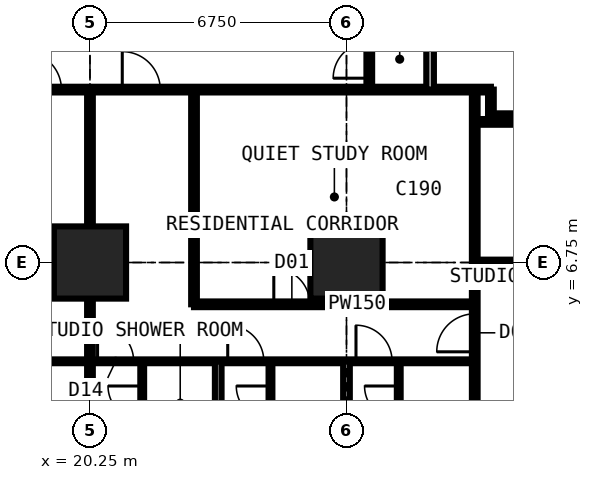
"""IFC4 building model, lengths in metres.
Left out: names, types, materials, properties, quantities, classifications, styles, units other than length and angle.
Written with IfcOpenShell. Run it as: python <this file> out.ifc"""

import sys

from ifc_helpers import new_model, si_unit, direction, frame, frame_2d, origin, origin_2d, place, context, subcontext, project, spatial, rectangle, extrude, element, fill, save


model = new_model("IFC4")
c1 = context("Model", 3, precision=1e-05, world=origin(), true_north=direction((0.0, 1.0)))
c2 = subcontext(c1, "Body", "Model", "MODEL_VIEW")
j1 = project(units=[si_unit("LENGTHUNIT", "METRE"), si_unit("PLANEANGLEUNIT", "RADIAN")], contexts=[c1])
p1 = place(None, origin())
s1 = spatial("IfcSite", under=j1, at=p1, CompositionType="ELEMENT")
p2 = place(p1, origin())
s2 = spatial("IfcBuilding", under=s1, at=p2, CompositionType="ELEMENT")
p3 = place(p2, frame((0.0, 0.0, 39.6)))
s3 = spatial("IfcBuildingStorey", under=s2, at=p3, CompositionType="ELEMENT", Elevation=39.6)
for number, where, z_axis, x_axis in (
    (1, (20.25, 6.75, 0.0), (0.0, 0.0, 1.0), (1.0, 0.0, 0.0)),
    (2, (27.0, 6.75, 0.0), (0.0, 0.0, 1.0), (1.0, 0.0, 0.0)),
):
    element("IfcColumn", number, at=place(p3, frame(where, z_axis=z_axis, x_axis=x_axis)), inside=s3, PredefinedType="COLUMN", context=c2, shape_type="SweptSolid", body=[
        extrude(rectangle(XDim=1.9, YDim=1.9, at=origin_2d()), origin(), (0.0, 0.0, 1.0), 3.6),
    ])
p4 = place(p3, frame((6.75, 4.15, 0.0), z_axis=(0.0, 0.0, 1.0), x_axis=(1.0, 0.0, 0.0)))
e3 = element("IfcWall", 3, at=p4, inside=s3, PredefinedType="PARTITIONING", context=c2, shape_type="SweptSolid", body=[
    extrude(rectangle(XDim=23.625, YDim=0.1, at=frame_2d((11.812, 0.0))), origin(), (0.0, 0.0, 1.0), 3.375),
])
p5 = place(p4, frame((1.2, 0.0, 0.0)))
e4 = element("IfcOpeningElement", 4, at=p5, cuts=e3, PredefinedType="OPENING", context=c2, shape_type="SweptSolid", body=[
    extrude(rectangle(XDim=1.0, YDim=2.2, at=frame_2d((0.5, 1.1))), frame((0.0, 0.06, 0.0), z_axis=(0.0, -1.0, 0.0), x_axis=(1.0, 0.0, 0.0)), (0.0, 0.0, 1.0), 0.12),
])
p6 = place(p4, frame((3.575, 0.0, 0.0)))
e5 = element("IfcOpeningElement", 5, at=p6, cuts=e3, PredefinedType="OPENING", context=c2, shape_type="SweptSolid", body=[
    extrude(rectangle(XDim=0.95, YDim=2.2, at=frame_2d((0.475, 1.1))), frame((0.0, 0.06, 0.0), z_axis=(0.0, -1.0, 0.0), x_axis=(1.0, 0.0, 0.0)), (0.0, 0.0, 1.0), 0.12),
])
p7 = place(p4, frame((7.0, 0.0, 0.0)))
e6 = element("IfcOpeningElement", 6, at=p7, cuts=e3, PredefinedType="OPENING", context=c2, shape_type="SweptSolid", body=[
    extrude(rectangle(XDim=0.95, YDim=2.2, at=frame_2d((0.475, 1.1))), frame((0.0, 0.06, 0.0), z_axis=(0.0, -1.0, 0.0), x_axis=(1.0, 0.0, 0.0)), (0.0, 0.0, 1.0), 0.12),
])
p8 = place(p4, frame((10.375, 0.0, 0.0)))
e7 = element("IfcOpeningElement", 7, at=p8, cuts=e3, PredefinedType="OPENING", context=c2, shape_type="SweptSolid", body=[
    extrude(rectangle(XDim=0.95, YDim=2.2, at=frame_2d((0.475, 1.1))), frame((0.0, 0.06, 0.0), z_axis=(0.0, -1.0, 0.0), x_axis=(1.0, 0.0, 0.0)), (0.0, 0.0, 1.0), 0.12),
])
p9 = place(p4, frame((13.7, 0.0, 0.0)))
e8 = element("IfcOpeningElement", 8, at=p9, cuts=e3, PredefinedType="OPENING", context=c2, shape_type="SweptSolid", body=[
    extrude(rectangle(XDim=0.95, YDim=2.2, at=frame_2d((0.475, 1.1))), frame((0.0, 0.06, 0.0), z_axis=(0.0, -1.0, 0.0), x_axis=(1.0, 0.0, 0.0)), (0.0, 0.0, 1.0), 0.12),
])
p10 = place(p4, frame((17.125, 0.0, 0.0)))
e9 = element("IfcOpeningElement", 9, at=p10, cuts=e3, PredefinedType="OPENING", context=c2, shape_type="SweptSolid", body=[
    extrude(rectangle(XDim=0.95, YDim=2.2, at=frame_2d((0.475, 1.1))), frame((0.0, 0.06, 0.0), z_axis=(0.0, -1.0, 0.0), x_axis=(1.0, 0.0, 0.0)), (0.0, 0.0, 1.0), 0.12),
])
p11 = place(p4, frame((20.5, 0.0, 0.0)))
e10 = element("IfcOpeningElement", 10, at=p11, cuts=e3, PredefinedType="OPENING", context=c2, shape_type="SweptSolid", body=[
    extrude(rectangle(XDim=0.95, YDim=2.2, at=frame_2d((0.475, 1.1))), frame((0.0, 0.06, 0.0), z_axis=(0.0, -1.0, 0.0), x_axis=(1.0, 0.0, 0.0)), (0.0, 0.0, 1.0), 0.12),
])
p12 = place(p3, frame((10.125, 11.3, 0.0), z_axis=(0.0, 0.0, 1.0), x_axis=(1.0, 0.0, 0.0)))
e11 = element("IfcWall", 11, at=p12, inside=s3, PredefinedType="PARTITIONING", context=c2, shape_type="SweptSolid", body=[
    extrude(rectangle(XDim=20.675, YDim=0.15, at=frame_2d((10.337, 0.0))), origin(), (0.0, 0.0, 1.0), 3.375),
])
p13 = place(p12, frame((8.375, 0.0, 0.0)))
e12 = element("IfcOpeningElement", 12, at=p13, cuts=e11, PredefinedType="OPENING", context=c2, shape_type="SweptSolid", body=[
    extrude(rectangle(XDim=1.0, YDim=2.2, at=frame_2d((0.5, 1.1))), frame((0.0, 0.085, 0.0), z_axis=(0.0, -1.0, 0.0), x_axis=(1.0, 0.0, 0.0)), (0.0, 0.0, 1.0), 0.17),
])
p14 = place(p12, frame((10.975, 0.0, 0.0)))
e13 = element("IfcOpeningElement", 13, at=p14, cuts=e11, PredefinedType="OPENING", context=c2, shape_type="SweptSolid", body=[
    extrude(rectangle(XDim=1.0, YDim=2.2, at=frame_2d((0.5, 1.1))), frame((0.0, 0.085, 0.0), z_axis=(0.0, -1.0, 0.0), x_axis=(1.0, 0.0, 0.0)), (0.0, 0.0, 1.0), 0.17),
])
p15 = place(p12, frame((3.925, 0.0, 0.0)))
e14 = element("IfcOpeningElement", 14, at=p15, cuts=e11, PredefinedType="OPENING", context=c2, shape_type="SweptSolid", body=[
    extrude(rectangle(XDim=0.95, YDim=2.2, at=frame_2d((0.475, 1.1))), frame((0.0, 0.085, 0.0), z_axis=(0.0, -1.0, 0.0), x_axis=(1.0, 0.0, 0.0)), (0.0, 0.0, 1.0), 0.17),
])
p16 = place(p3, frame((20.25, -0.734, 0.0), z_axis=(0.0, 0.0, 1.0), x_axis=(0.0, 1.0, 0.0)))
e15 = element("IfcWall", 15, at=p16, inside=s3, PredefinedType="PARTITIONING", context=c2, shape_type="SweptSolid", body=[
    extrude(rectangle(XDim=12.034, YDim=0.15, at=frame_2d((6.017, 0.0))), origin(), (0.0, 0.0, 1.0), 2.61),
])
p17 = place(p3, frame((21.625, 1.95, 0.0), z_axis=(0.0, 0.0, 1.0), x_axis=(0.0, 1.0, 0.0)))
e16 = element("IfcWall", 16, at=p17, inside=s3, PredefinedType="PARTITIONING", context=c2, shape_type="SweptSolid", body=[
    extrude(rectangle(XDim=2.2, YDim=0.1, at=frame_2d((1.1, 0.0))), origin(), (0.0, 0.0, 1.0), 3.375),
])
p18 = place(p17, frame((0.65, 0.0, 0.0)))
e17 = element("IfcOpeningElement", 17, at=p18, cuts=e16, PredefinedType="OPENING", context=c2, shape_type="SweptSolid", body=[
    extrude(rectangle(XDim=0.9, YDim=2.2, at=frame_2d((0.45, 1.1))), frame((0.0, 0.06, 0.0), z_axis=(0.0, -1.0, 0.0), x_axis=(1.0, 0.0, 0.0)), (0.0, 0.0, 1.0), 0.12),
])
p19 = place(p3, frame((22.988, 5.65, 0.0), z_axis=(0.0, 0.0, 1.0), x_axis=(1.0, 0.0, 0.0)))
e18 = element("IfcWall", 18, at=p19, inside=s3, PredefinedType="PARTITIONING", context=c2, shape_type="SweptSolid", body=[
    extrude(rectangle(XDim=7.387, YDim=0.15, at=frame_2d((3.694, 0.0))), origin(), (0.0, 0.0, 1.0), 3.375),
])
p20 = place(p19, frame((2.1, 0.0, 0.0)))
e19 = element("IfcOpeningElement", 19, at=p20, cuts=e18, PredefinedType="OPENING", context=c2, shape_type="SweptSolid", body=[
    extrude(rectangle(XDim=0.95, YDim=2.2, at=frame_2d((0.475, 1.1))), frame((0.0, 0.085, 0.0), z_axis=(0.0, -1.0, 0.0), x_axis=(1.0, 0.0, 0.0)), (0.0, 0.0, 1.0), 0.17),
])
p21 = place(p3, frame((22.988, 5.65, 0.0), z_axis=(0.0, 0.0, 1.0), x_axis=(0.0, 1.0, 0.0)))
e20 = element("IfcWall", 20, at=p21, inside=s3, PredefinedType="PARTITIONING", context=c2, shape_type="SweptSolid", body=[
    extrude(rectangle(XDim=5.65, YDim=0.15, at=frame_2d((2.825, 0.0))), origin(), (0.0, 0.0, 1.0), 3.375),
])
p22 = place(p3, frame((23.625, -0.734, 0.0), z_axis=(0.0, 0.0, 1.0), x_axis=(0.0, 1.0, 0.0)))
e21 = element("IfcWall", 21, at=p22, inside=s3, PredefinedType="PARTITIONING", context=c2, shape_type="SweptSolid", body=[
    extrude(rectangle(XDim=4.884, YDim=0.175, at=frame_2d((2.442, 0.0))), origin(), (0.0, 0.0, 1.0), 3.375),
])
p23 = place(p3, frame((25.0, 1.95, 0.0), z_axis=(0.0, 0.0, 1.0), x_axis=(0.0, 1.0, 0.0)))
e22 = element("IfcWall", 22, at=p23, inside=s3, PredefinedType="PARTITIONING", context=c2, shape_type="SweptSolid", body=[
    extrude(rectangle(XDim=2.2, YDim=0.1, at=frame_2d((1.1, 0.0))), origin(), (0.0, 0.0, 1.0), 3.375),
])
p24 = place(p23, frame((0.65, 0.0, 0.0)))
e23 = element("IfcOpeningElement", 23, at=p24, cuts=e22, PredefinedType="OPENING", context=c2, shape_type="SweptSolid", body=[
    extrude(rectangle(XDim=0.9, YDim=2.2, at=frame_2d((0.45, 1.1))), frame((0.0, 0.06, 0.0), z_axis=(0.0, -1.0, 0.0), x_axis=(1.0, 0.0, 0.0)), (0.0, 0.0, 1.0), 0.12),
])
p25 = place(p3, frame((27.0, -0.734, 0.0), z_axis=(0.0, 0.0, 1.0), x_axis=(0.0, 1.0, 0.0)))
e24 = element("IfcWall", 24, at=p25, inside=s3, PredefinedType="PARTITIONING", context=c2, shape_type="SweptSolid", body=[
    extrude(rectangle(XDim=4.884, YDim=0.175, at=frame_2d((2.442, 0.0))), origin(), (0.0, 0.0, 1.0), 2.61),
])
p26 = place(p3, frame((27.6, 11.3, 0.0), z_axis=(0.0, 0.0, 1.0), x_axis=(0.0, 1.0, 0.0)))
e25 = element("IfcWall", 25, at=p26, inside=s3, PredefinedType="PARTITIONING", context=c2, shape_type="SweptSolid", body=[
    extrude(rectangle(XDim=1.6, YDim=0.15, at=frame_2d((0.8, 0.0))), origin(), (0.0, 0.0, 1.0), 3.375),
])
p27 = place(p26, frame((0.3, 0.0, 0.0)))
e26 = element("IfcOpeningElement", 26, at=p27, cuts=e25, PredefinedType="OPENING", context=c2, shape_type="SweptSolid", body=[
    extrude(rectangle(XDim=0.95, YDim=2.2, at=frame_2d((0.475, 1.1))), frame((0.0, 0.085, 0.0), z_axis=(0.0, -1.0, 0.0), x_axis=(1.0, 0.0, 0.0)), (0.0, 0.0, 1.0), 0.17),
])
p28 = place(p3, frame((28.375, 1.95, 0.0), z_axis=(0.0, 0.0, 1.0), x_axis=(0.0, 1.0, 0.0)))
e27 = element("IfcWall", 27, at=p28, inside=s3, PredefinedType="PARTITIONING", context=c2, shape_type="SweptSolid", body=[
    extrude(rectangle(XDim=2.2, YDim=0.1, at=frame_2d((1.1, 0.0))), origin(), (0.0, 0.0, 1.0), 3.375),
])
p29 = place(p28, frame((0.65, 0.0, 0.0)))
e28 = element("IfcOpeningElement", 28, at=p29, cuts=e27, PredefinedType="OPENING", context=c2, shape_type="SweptSolid", body=[
    extrude(rectangle(XDim=0.9, YDim=2.2, at=frame_2d((0.45, 1.1))), frame((0.0, 0.06, 0.0), z_axis=(0.0, -1.0, 0.0), x_axis=(1.0, 0.0, 0.0)), (0.0, 0.0, 1.0), 0.12),
])
p30 = place(p3, frame((29.2, 11.3, 0.0), z_axis=(0.0, 0.0, 1.0), x_axis=(0.0, 1.0, 0.0)))
e29 = element("IfcWall", 29, at=p30, inside=s3, PredefinedType="PARTITIONING", context=c2, shape_type="SweptSolid", body=[
    extrude(rectangle(XDim=17.9, YDim=0.2, at=frame_2d((8.95, 0.0))), origin(), (0.0, 0.0, 1.0), 3.375),
])
p31 = place(p30, frame((8.35, 0.0, 0.0)))
e30 = element("IfcOpeningElement", 30, at=p31, cuts=e29, PredefinedType="OPENING", context=c2, shape_type="SweptSolid", body=[
    extrude(rectangle(XDim=1.2, YDim=2.2, at=frame_2d((0.6, 1.1))), frame((0.0, 0.11, 0.0), z_axis=(0.0, -1.0, 0.0), x_axis=(1.0, 0.0, 0.0)), (0.0, 0.0, 1.0), 0.22),
])
p32 = place(p3, frame((30.375, -0.734, 0.0), z_axis=(0.0, 0.0, 1.0), x_axis=(0.0, 1.0, 0.0)))
e31 = element("IfcWall", 31, at=p32, inside=s3, PredefinedType="PARTITIONING", context=c2, shape_type="SweptSolid", body=[
    extrude(rectangle(XDim=12.034, YDim=0.15, at=frame_2d((6.017, 0.0))), origin(), (0.0, 0.0, 1.0), 3.375),
])
p33 = place(p32, frame((5.134, 0.0, 0.0)))
e32 = element("IfcOpeningElement", 32, at=p33, cuts=e31, PredefinedType="OPENING", context=c2, shape_type="SweptSolid", body=[
    extrude(rectangle(XDim=1.0, YDim=2.2, at=frame_2d((0.5, 1.1))), frame((0.0, 0.085, 0.0), z_axis=(0.0, -1.0, 0.0), x_axis=(1.0, 0.0, 0.0)), (0.0, 0.0, 1.0), 0.17),
])
p34 = place(p3, frame((30.375, 6.75, 0.0), z_axis=(0.0, 0.0, 1.0), x_axis=(1.0, 0.0, 0.0)))
e33 = element("IfcWall", 33, at=p34, inside=s3, PredefinedType="PARTITIONING", context=c2, shape_type="SweptSolid", body=[
    extrude(rectangle(XDim=5.975, YDim=0.15, at=frame_2d((2.988, 0.0))), origin(), (0.0, 0.0, 1.0), 2.877),
])
p35 = place(p3, frame((30.375, 10.45, 0.0), z_axis=(0.0, 0.0, 1.0), x_axis=(1.0, 0.0, 0.0)))
e34 = element("IfcWall", 34, at=p35, inside=s3, PredefinedType="PARTITIONING", context=c2, shape_type="SweptSolid", body=[
    extrude(rectangle(XDim=4.475, YDim=0.15, at=frame_2d((2.238, 0.0))), origin(), (0.0, 0.0, 1.0), 3.375),
])
p36 = place(p35, frame((2.35, 0.0, 0.0)))
e35 = element("IfcOpeningElement", 35, at=p36, cuts=e34, PredefinedType="OPENING", context=c2, shape_type="SweptSolid", body=[
    extrude(rectangle(XDim=0.95, YDim=2.2, at=frame_2d((0.475, 1.1))), frame((0.0, 0.085, 0.0), z_axis=(0.0, -1.0, 0.0), x_axis=(1.0, 0.0, 0.0)), (0.0, 0.0, 1.0), 0.17),
])
p37 = place(p3, frame((30.8, 10.6, 0.0), z_axis=(0.0, 0.0, 1.0), x_axis=(0.0, 1.0, 0.0)))
e36 = element("IfcWall", 36, at=p37, inside=s3, PredefinedType="PARTITIONING", context=c2, shape_type="SweptSolid", body=[
    extrude(rectangle(XDim=0.7, YDim=0.15, at=frame_2d((0.35, 0.0))), origin(), (0.0, 0.0, 1.0), 3.375),
])
p38 = place(p3, frame((30.8, 10.6, 0.0), z_axis=(0.0, 0.0, 1.0), x_axis=(1.0, 0.0, 0.0)))
e37 = element("IfcWall", 37, at=p38, inside=s3, PredefinedType="PARTITIONING", context=c2, shape_type="SweptSolid", body=[
    extrude(rectangle(XDim=1.85, YDim=0.15, at=frame_2d((0.925, 0.0))), origin(), (0.0, 0.0, 1.0), 3.375),
])
p39 = place(p27, origin())
e38 = element("IfcDoor", 38, at=p39, inside=s3, OperationType="SINGLE_SWING_LEFT", PredefinedType="DOOR", context=c2, shape_type="SweptSolid", body=[
    extrude(rectangle(XDim=0.95, YDim=2.2, at=frame_2d((0.475, 1.1))), frame((0.0, 0.025, 0.0), z_axis=(0.0, -1.0, 0.0), x_axis=(1.0, 0.0, 0.0)), (0.0, 0.0, 1.0), 0.05),
])
fill(e26, e38)
p40 = place(p13, origin())
e39 = element("IfcDoor", 39, at=p40, inside=s3, OperationType="SINGLE_SWING_LEFT", PredefinedType="DOOR", context=c2, shape_type="SweptSolid", body=[
    extrude(rectangle(XDim=1.0, YDim=2.2, at=frame_2d((0.5, 1.1))), frame((0.0, 0.025, 0.0), z_axis=(0.0, -1.0, 0.0), x_axis=(1.0, 0.0, 0.0)), (0.0, 0.0, 1.0), 0.05),
])
fill(e12, e39)
p41 = place(p9, origin())
e40 = element("IfcDoor", 40, at=p41, inside=s3, OperationType="SINGLE_SWING_LEFT", PredefinedType="DOOR", context=c2, shape_type="SweptSolid", body=[
    extrude(rectangle(XDim=0.95, YDim=2.2, at=frame_2d((0.475, 1.1))), frame((0.0, 0.025, 0.0), z_axis=(0.0, -1.0, 0.0), x_axis=(1.0, 0.0, 0.0)), (0.0, 0.0, 1.0), 0.05),
])
fill(e8, e40)
p42 = place(p18, origin())
e41 = element("IfcDoor", 41, at=p42, inside=s3, OperationType="SINGLE_SWING_RIGHT", PredefinedType="DOOR", context=c2, shape_type="SweptSolid", body=[
    extrude(rectangle(XDim=0.9, YDim=2.2, at=frame_2d((0.45, 1.1))), frame((0.0, 0.025, 0.0), z_axis=(0.0, -1.0, 0.0), x_axis=(1.0, 0.0, 0.0)), (0.0, 0.0, 1.0), 0.05),
])
fill(e17, e41)
p43 = place(p10, origin())
e42 = element("IfcDoor", 42, at=p43, inside=s3, OperationType="SINGLE_SWING_LEFT", PredefinedType="DOOR", context=c2, shape_type="SweptSolid", body=[
    extrude(rectangle(XDim=0.95, YDim=2.2, at=frame_2d((0.475, 1.1))), frame((0.0, 0.025, 0.0), z_axis=(0.0, -1.0, 0.0), x_axis=(1.0, 0.0, 0.0)), (0.0, 0.0, 1.0), 0.05),
])
fill(e9, e42)
p44 = place(p24, origin())
e43 = element("IfcDoor", 43, at=p44, inside=s3, OperationType="SINGLE_SWING_RIGHT", PredefinedType="DOOR", context=c2, shape_type="SweptSolid", body=[
    extrude(rectangle(XDim=0.9, YDim=2.2, at=frame_2d((0.45, 1.1))), frame((0.0, 0.025, 0.0), z_axis=(0.0, -1.0, 0.0), x_axis=(1.0, 0.0, 0.0)), (0.0, 0.0, 1.0), 0.05),
])
fill(e23, e43)
p45 = place(p11, origin())
e44 = element("IfcDoor", 44, at=p45, inside=s3, OperationType="SINGLE_SWING_LEFT", PredefinedType="DOOR", context=c2, shape_type="SweptSolid", body=[
    extrude(rectangle(XDim=0.95, YDim=2.2, at=frame_2d((0.475, 1.1))), frame((0.0, 0.025, 0.0), z_axis=(0.0, -1.0, 0.0), x_axis=(1.0, 0.0, 0.0)), (0.0, 0.0, 1.0), 0.05),
])
fill(e10, e44)
p46 = place(p29, origin())
e45 = element("IfcDoor", 45, at=p46, inside=s3, OperationType="SINGLE_SWING_RIGHT", PredefinedType="DOOR", context=c2, shape_type="SweptSolid", body=[
    extrude(rectangle(XDim=0.9, YDim=2.2, at=frame_2d((0.45, 1.1))), frame((0.0, 0.025, 0.0), z_axis=(0.0, -1.0, 0.0), x_axis=(1.0, 0.0, 0.0)), (0.0, 0.0, 1.0), 0.05),
])
fill(e28, e45)
p47 = place(p14, origin())
e46 = element("IfcDoor", 46, at=p47, inside=s3, OperationType="SINGLE_SWING_LEFT", PredefinedType="DOOR", context=c2, shape_type="SweptSolid", body=[
    extrude(rectangle(XDim=1.0, YDim=2.2, at=frame_2d((0.5, 1.1))), frame((0.0, 0.025, 0.0), z_axis=(0.0, -1.0, 0.0), x_axis=(1.0, 0.0, 0.0)), (0.0, 0.0, 1.0), 0.05),
])
fill(e13, e46)
p48 = place(p20, origin())
e47 = element("IfcDoor", 47, at=p48, inside=s3, OperationType="SINGLE_SWING_LEFT", PredefinedType="DOOR", context=c2, shape_type="SweptSolid", body=[
    extrude(rectangle(XDim=0.95, YDim=2.2, at=frame_2d((0.475, 1.1))), frame((0.0, 0.025, 0.0), z_axis=(0.0, -1.0, 0.0), x_axis=(1.0, 0.0, 0.0)), (0.0, 0.0, 1.0), 0.05),
])
fill(e19, e47)
p49 = place(p33, origin())
e48 = element("IfcDoor", 48, at=p49, inside=s3, OperationType="SINGLE_SWING_LEFT", PredefinedType="DOOR", context=c2, shape_type="SweptSolid", body=[
    extrude(rectangle(XDim=1.0, YDim=2.2, at=frame_2d((0.5, 1.1))), frame((0.0, 0.025, 0.0), z_axis=(0.0, -1.0, 0.0), x_axis=(1.0, 0.0, 0.0)), (0.0, 0.0, 1.0), 0.05),
])
fill(e32, e48)
save(model, sys.argv[1])
